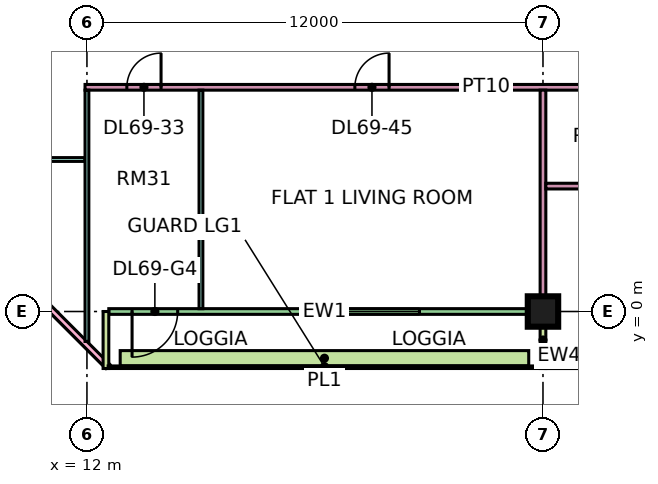
"""IFC4 building model, lengths in metres.
Left out: names, types, materials, properties, quantities, classifications, styles, units other than length and angle.
Written with IfcOpenShell. Run it as: python <this file> out.ifc"""

import sys

from ifc_helpers import new_model, si_unit, direction, frame, frame_2d, origin, origin_2d, place, context, subcontext, project, spatial, rectangle, extrude, element, fill, save


model = new_model("IFC4")
c1 = context("Model", 3, precision=1e-05, world=origin(), true_north=direction((0.0, 1.0)))
c2 = subcontext(c1, "Body", "Model", "MODEL_VIEW")
j1 = project(units=[si_unit("LENGTHUNIT", "METRE"), si_unit("PLANEANGLEUNIT", "RADIAN")], contexts=[c1])
p1 = place(None, origin())
s1 = spatial("IfcSite", under=j1, at=p1, CompositionType="ELEMENT")
p2 = place(p1, origin())
s2 = spatial("IfcBuilding", under=s1, at=p2, CompositionType="ELEMENT")
p3 = place(p2, frame((0.0, 0.0, 295.9)))
s3 = spatial("IfcBuildingStorey", under=s2, at=p3, CompositionType="ELEMENT", Elevation=295.9)
p4 = place(p3, frame((24.0, 0.0, 0.0), z_axis=(0.0, 0.0, 1.0), x_axis=(1.0, 0.0, 0.0)))
e1 = element("IfcColumn", 1, at=p4, inside=s3, PredefinedType="COLUMN", context=c2, shape_type="SweptSolid", body=[
    extrude(rectangle(XDim=0.8, YDim=0.8, at=origin_2d()), origin(), (0.0, 0.0, 1.0), 3.75),
])
p5 = place(p3, frame((-1.447, 12.553, 0.0), z_axis=(0.0, 0.0, 1.0), x_axis=(0.707106781187, -0.707106781187, 0.0)))
e2 = element("IfcWall", 2, at=p5, inside=s3, PredefinedType="SOLIDWALL", context=c2, shape_type="SweptSolid", body=[
    extrude(rectangle(XDim=19.799, YDim=0.15, at=frame_2d((9.899, 0.0))), origin(), (0.0, 0.0, 1.0), 3.35),
])
p6 = place(p5, frame((2.212, 0.0, 0.45)))
e3 = element("IfcOpeningElement", 3, at=p6, cuts=e2, PredefinedType="OPENING", context=c2, shape_type="SweptSolid", body=[
    extrude(rectangle(XDim=3.0, YDim=2.4, at=frame_2d((1.5, 1.2))), frame((0.0, 0.085, 0.0), z_axis=(0.0, -1.0, 0.0), x_axis=(1.0, 0.0, 0.0)), (0.0, 0.0, 1.0), 0.17),
])
p7 = place(p5, frame((10.216, 0.0, 0.45)))
e4 = element("IfcOpeningElement", 4, at=p7, cuts=e2, PredefinedType="OPENING", context=c2, shape_type="SweptSolid", body=[
    extrude(rectangle(XDim=3.0, YDim=2.4, at=frame_2d((1.5, 1.2))), frame((0.0, 0.085, 0.0), z_axis=(0.0, -1.0, 0.0), x_axis=(1.0, 0.0, 0.0)), (0.0, 0.0, 1.0), 0.17),
])
p8 = place(p3, frame((12.575, 0.0, 0.0), z_axis=(0.0, 0.0, 1.0), x_axis=(1.0, 0.0, 0.0)))
e5 = element("IfcWall", 5, at=p8, inside=s3, PredefinedType="SOLIDWALL", context=c2, shape_type="SweptSolid", body=[
    extrude(rectangle(XDim=11.35, YDim=0.15, at=frame_2d((5.675, 0.0))), origin(), (0.0, 0.0, 1.0), 3.35),
])
p9 = place(p8, frame((0.613, 0.0, 0.0)))
e6 = element("IfcOpeningElement", 6, at=p9, cuts=e5, PredefinedType="OPENING", context=c2, shape_type="SweptSolid", body=[
    extrude(rectangle(XDim=1.2, YDim=2.4, at=frame_2d((0.6, 1.2))), frame((0.0, 0.085, 0.0), z_axis=(0.0, -1.0, 0.0), x_axis=(1.0, 0.0, 0.0)), (0.0, 0.0, 1.0), 0.17),
])
p10 = place(p8, frame((5.175, 0.0, 0.45)))
e7 = element("IfcOpeningElement", 7, at=p10, cuts=e5, PredefinedType="OPENING", context=c2, shape_type="SweptSolid", body=[
    extrude(rectangle(XDim=3.0, YDim=2.4, at=frame_2d((1.5, 1.2))), frame((0.0, 0.085, 0.0), z_axis=(0.0, -1.0, 0.0), x_axis=(1.0, 0.0, 0.0)), (0.0, 0.0, 1.0), 0.17),
])
for number, where, z_axis, x_axis in (
    (8, (12.5, -1.5, 0.0), (0.0, 0.0, 1.0), (0.0, 1.0, 0.0)),
    (9, (24.0, -1.5, 0.0), (0.0, 0.0, 1.0), (0.0, 1.0, 0.0)),
):
    element("IfcWall", number, at=place(p3, frame(where, z_axis=z_axis, x_axis=x_axis)), inside=s3, PredefinedType="SOLIDWALL", context=c2, shape_type="SweptSolid", body=[
        extrude(rectangle(XDim=1.5, YDim=0.15, at=frame_2d((0.75, 0.0))), origin(), (0.0, 0.0, 1.0), 3.35),
    ])
p11 = place(p3, frame((24.075, -1.425, 0.0), z_axis=(0.0, 0.0, 1.0), x_axis=(1.0, 0.0, 0.0)))
e10 = element("IfcWall", 10, at=p11, inside=s3, PredefinedType="SOLIDWALL", context=c2, shape_type="SweptSolid", body=[
    extrude(rectangle(XDim=11.85, YDim=0.15, at=frame_2d((5.925, 0.0))), origin(), (0.0, 0.0, 1.0), 3.35),
])
p12 = place(p11, frame((1.462, 0.0, 0.45)))
e11 = element("IfcOpeningElement", 11, at=p12, cuts=e10, PredefinedType="OPENING", context=c2, shape_type="SweptSolid", body=[
    extrude(rectangle(XDim=3.0, YDim=2.4, at=frame_2d((1.5, 1.2))), frame((0.0, 0.085, 0.0), z_axis=(0.0, -1.0, 0.0), x_axis=(1.0, 0.0, 0.0)), (0.0, 0.0, 1.0), 0.17),
])
p13 = place(p11, frame((6.525, 0.0, 0.45)))
e12 = element("IfcOpeningElement", 12, at=p13, cuts=e10, PredefinedType="OPENING", context=c2, shape_type="SweptSolid", body=[
    extrude(rectangle(XDim=1.8, YDim=2.4, at=frame_2d((0.9, 1.2))), frame((0.0, 0.085, 0.0), z_axis=(0.0, -1.0, 0.0), x_axis=(1.0, 0.0, 0.0)), (0.0, 0.0, 1.0), 0.17),
])
p14 = place(p11, frame((9.488, 0.0, 0.45)))
e13 = element("IfcOpeningElement", 13, at=p14, cuts=e10, PredefinedType="OPENING", context=c2, shape_type="SweptSolid", body=[
    extrude(rectangle(XDim=1.8, YDim=2.4, at=frame_2d((0.9, 1.2))), frame((0.0, 0.085, 0.0), z_axis=(0.0, -1.0, 0.0), x_axis=(1.0, 0.0, 0.0)), (0.0, 0.0, 1.0), 0.17),
])
p15 = place(p3, frame((12.875, -1.229, 0.0), z_axis=(0.0, 0.0, 1.0), x_axis=(1.0, 0.0, 0.0)))
e14 = element("IfcWall", 14, at=p15, inside=s3, PredefinedType="SOLIDWALL", context=c2, shape_type="SweptSolid", body=[
    extrude(rectangle(XDim=10.75, YDim=0.4, at=frame_2d((5.375, 0.0))), origin(), (0.0, 0.0, 1.0), 0.7),
])
p16 = place(p3, frame((9.05, 4.0, 0.0), z_axis=(0.0, 0.0, 1.0), x_axis=(1.0, 0.0, 0.0)))
e15 = element("IfcWall", 15, at=p16, inside=s3, PredefinedType="PARTITIONING", context=c2, shape_type="SweptSolid", body=[
    extrude(rectangle(XDim=2.9, YDim=0.1, at=frame_2d((1.45, 0.0))), origin(), (0.0, 0.0, 1.0), 3.35),
])
p17 = place(p3, frame((11.95, 5.9, 0.0), z_axis=(0.0, 0.0, 1.0), x_axis=(1.0, 0.0, 0.0)))
e16 = element("IfcWall", 16, at=p17, inside=s3, PredefinedType="PARTITIONING", context=c2, shape_type="SweptSolid", body=[
    extrude(rectangle(XDim=21.1, YDim=0.15, at=frame_2d((10.55, 0.0))), origin(), (0.0, 0.0, 1.0), 3.35),
])
p18 = place(p17, frame((1.1, 0.0, 0.0)))
e17 = element("IfcOpeningElement", 17, at=p18, cuts=e16, PredefinedType="OPENING", context=c2, shape_type="SweptSolid", body=[
    extrude(rectangle(XDim=0.9, YDim=2.1, at=frame_2d((0.45, 1.05))), frame((0.0, 0.085, 0.0), z_axis=(0.0, -1.0, 0.0), x_axis=(1.0, 0.0, 0.0)), (0.0, 0.0, 1.0), 0.17),
])
p19 = place(p17, frame((16.1, 0.0, 0.0)))
e18 = element("IfcOpeningElement", 18, at=p19, cuts=e16, PredefinedType="OPENING", context=c2, shape_type="SweptSolid", body=[
    extrude(rectangle(XDim=0.9, YDim=2.1, at=frame_2d((0.45, 1.05))), frame((0.0, 0.085, 0.0), z_axis=(0.0, -1.0, 0.0), x_axis=(1.0, 0.0, 0.0)), (0.0, 0.0, 1.0), 0.17),
])
p20 = place(p17, frame((7.1, 0.0, 0.0)))
e19 = element("IfcOpeningElement", 19, at=p20, cuts=e16, PredefinedType="OPENING", context=c2, shape_type="SweptSolid", body=[
    extrude(rectangle(XDim=0.9, YDim=2.1, at=frame_2d((0.45, 1.05))), frame((0.0, 0.085, 0.0), z_axis=(0.0, -1.0, 0.0), x_axis=(1.0, 0.0, 0.0)), (0.0, 0.0, 1.0), 0.17),
])
p21 = place(p3, frame((12.0, -0.788, 0.0), z_axis=(0.0, 0.0, 1.0), x_axis=(0.0, 1.0, 0.0)))
e20 = element("IfcWall", 20, at=p21, inside=s3, PredefinedType="PARTITIONING", context=c2, shape_type="SweptSolid", body=[
    extrude(rectangle(XDim=6.613, YDim=0.1, at=frame_2d((3.306, 0.0))), origin(), (0.0, 0.0, 1.0), 3.35),
])
p22 = place(p3, frame((15.0, 0.074, 0.0), z_axis=(0.0, 0.0, 1.0), x_axis=(0.0, 1.0, 0.0)))
e21 = element("IfcWall", 21, at=p22, inside=s3, PredefinedType="PARTITIONING", context=c2, shape_type="SweptSolid", body=[
    extrude(rectangle(XDim=5.751, YDim=0.1, at=frame_2d((2.875, 0.0))), origin(), (0.0, 0.0, 1.0), 3.35),
])
p23 = place(p3, frame((24.0, 0.0, 0.0), z_axis=(0.0, 0.0, 1.0), x_axis=(0.0, 1.0, 0.0)))
e22 = element("IfcWall", 22, at=p23, inside=s3, PredefinedType="PARTITIONING", context=c2, shape_type="SweptSolid", body=[
    extrude(rectangle(XDim=5.825, YDim=0.15, at=frame_2d((2.913, 0.0))), origin(), (0.0, 0.0, 1.0), 3.35),
])
p24 = place(p3, frame((24.075, 3.3, 0.0), z_axis=(0.0, 0.0, 1.0), x_axis=(1.0, 0.0, 0.0)))
e23 = element("IfcWall", 23, at=p24, inside=s3, PredefinedType="PARTITIONING", context=c2, shape_type="SweptSolid", body=[
    extrude(rectangle(XDim=3.0, YDim=0.15, at=frame_2d((1.5, 0.0))), origin(), (0.0, 0.0, 1.0), 3.35),
])
p25 = place(p9, frame((1.2, 0.0, 0.0), z_axis=(0.0, 0.0, 1.0), x_axis=(-1.0, 0.0, 0.0)))
e24 = element("IfcDoor", 24, at=p25, inside=s3, OperationType="DOUBLE_DOOR_SINGLE_SWING", PredefinedType="DOOR", context=c2, shape_type="SweptSolid", body=[
    extrude(rectangle(XDim=1.2, YDim=2.4, at=frame_2d((0.6, 1.2))), frame((0.0, 0.025, 0.0), z_axis=(0.0, -1.0, 0.0), x_axis=(1.0, 0.0, 0.0)), (0.0, 0.0, 1.0), 0.05),
])
fill(e6, e24)
p26 = place(p10, origin())
e25 = element("IfcWindow", 25, at=p26, inside=s3, PartitioningType="SINGLE_PANEL", PredefinedType="WINDOW", context=c2, shape_type="SweptSolid", body=[
    extrude(rectangle(XDim=3.0, YDim=2.4, at=frame_2d((1.5, 1.2))), frame((0.0, 0.03, 0.0), z_axis=(0.0, -1.0, 0.0), x_axis=(1.0, 0.0, 0.0)), (0.0, 0.0, 1.0), 0.06),
])
fill(e7, e25)
p27 = place(p18, frame((0.9, 0.0, 0.0), z_axis=(0.0, 0.0, 1.0), x_axis=(-1.0, 0.0, 0.0)))
e26 = element("IfcDoor", 26, at=p27, inside=s3, OperationType="SINGLE_SWING_RIGHT", PredefinedType="DOOR", context=c2, shape_type="SweptSolid", body=[
    extrude(rectangle(XDim=0.9, YDim=2.1, at=frame_2d((0.45, 1.05))), frame((0.0, 0.025, 0.0), z_axis=(0.0, -1.0, 0.0), x_axis=(1.0, 0.0, 0.0)), (0.0, 0.0, 1.0), 0.05),
])
fill(e17, e26)
p28 = place(p20, frame((0.9, 0.0, 0.0), z_axis=(0.0, 0.0, 1.0), x_axis=(-1.0, 0.0, 0.0)))
e27 = element("IfcDoor", 27, at=p28, inside=s3, OperationType="SINGLE_SWING_RIGHT", PredefinedType="DOOR", context=c2, shape_type="SweptSolid", body=[
    extrude(rectangle(XDim=0.9, YDim=2.1, at=frame_2d((0.45, 1.05))), frame((0.0, 0.025, 0.0), z_axis=(0.0, -1.0, 0.0), x_axis=(1.0, 0.0, 0.0)), (0.0, 0.0, 1.0), 0.05),
])
fill(e19, e27)
save(model, sys.argv[1])
